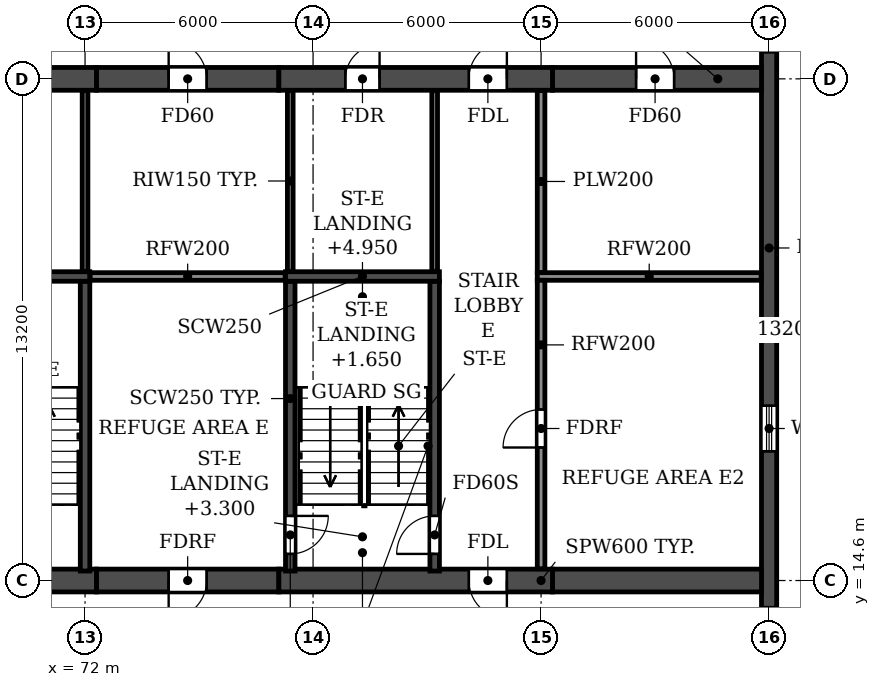
"""IFC4 building model, lengths in metres.
Left out: names, types, materials, properties, quantities, classifications, styles, units other than length and angle.
Written with IfcOpenShell. Run it as: python <this file> out.ifc"""

import sys

from ifc_helpers import new_model, si_unit, direction, frame, frame_2d, origin, place, context, subcontext, project, spatial, rectangle, extrude, element, fill, save


model = new_model("IFC4")
c1 = context("Model", 3, precision=1e-05, world=origin(), true_north=direction((0.0, 1.0)))
c2 = subcontext(c1, "Body", "Model", "MODEL_VIEW")
j1 = project(units=[si_unit("LENGTHUNIT", "METRE"), si_unit("PLANEANGLEUNIT", "RADIAN")], contexts=[c1])
p1 = place(None, origin())
s1 = spatial("IfcSite", under=j1, at=p1, CompositionType="ELEMENT")
p2 = place(p1, origin())
s2 = spatial("IfcBuilding", under=s1, at=p2, CompositionType="ELEMENT")
p3 = place(p2, frame((0.0, 0.0, 115.8)))
s3 = spatial("IfcBuildingStorey", under=s2, at=p3, CompositionType="ELEMENT", Elevation=115.8)
p4 = place(p3, frame((90.0, 4.683, 0.0), z_axis=(0.0, 0.0, 1.0), x_axis=(0.0, 1.0, 0.0)))
e1 = element("IfcWall", 1, at=p4, inside=s3, PredefinedType="SHEAR", context=c2, shape_type="SweptSolid", body=[
    extrude(rectangle(XDim=34.234, YDim=0.4, at=frame_2d((17.117, 0.0))), origin(), (0.0, 0.0, 1.0), 6.37),
])
p5 = place(p4, frame((23.817, 0.0, 0.9)))
e2 = element("IfcOpeningElement", 2, at=p5, cuts=e1, PredefinedType="OPENING", context=c2, shape_type="SweptSolid", body=[
    extrude(rectangle(XDim=1.2, YDim=1.5, at=frame_2d((0.6, 0.75))), frame((0.0, 0.21, 0.0), z_axis=(0.0, -1.0, 0.0), x_axis=(1.0, 0.0, 0.0)), (0.0, 0.0, 1.0), 0.42),
])
p6 = place(p4, frame((8.017, 0.0, 0.9)))
e3 = element("IfcOpeningElement", 3, at=p6, cuts=e1, PredefinedType="OPENING", context=c2, shape_type="SweptSolid", body=[
    extrude(rectangle(XDim=1.2, YDim=1.5, at=frame_2d((0.6, 0.75))), frame((0.0, 0.21, 0.0), z_axis=(0.0, -1.0, 0.0), x_axis=(1.0, 0.0, 0.0)), (0.0, 0.0, 1.0), 0.42),
])
p7 = place(p4, frame((13.317, 0.0, 0.9)))
e4 = element("IfcOpeningElement", 4, at=p7, cuts=e1, PredefinedType="OPENING", context=c2, shape_type="SweptSolid", body=[
    extrude(rectangle(XDim=1.2, YDim=1.5, at=frame_2d((0.6, 0.75))), frame((0.0, 0.21, 0.0), z_axis=(0.0, -1.0, 0.0), x_axis=(1.0, 0.0, 0.0)), (0.0, 0.0, 1.0), 0.42),
])
p8 = place(p3, frame((72.3, 14.6, 0.0), z_axis=(0.0, 0.0, 1.0), x_axis=(1.0, 0.0, 0.0)))
e5 = element("IfcWall", 5, at=p8, inside=s3, PredefinedType="SHEAR", context=c2, shape_type="SweptSolid", body=[
    extrude(rectangle(XDim=4.8, YDim=0.6, at=frame_2d((2.4, 0.0))), origin(), (0.0, 0.0, 1.0), 6.37),
])
p9 = place(p8, frame((1.9, 0.0, 0.0)))
e6 = element("IfcOpeningElement", 6, at=p9, cuts=e5, PredefinedType="OPENING", context=c2, shape_type="SweptSolid", body=[
    extrude(rectangle(XDim=1.0, YDim=2.1, at=frame_2d((0.5, 1.05))), frame((0.0, 0.31, 0.0), z_axis=(0.0, -1.0, 0.0), x_axis=(1.0, 0.0, 0.0)), (0.0, 0.0, 1.0), 0.62),
])
p10 = place(p3, frame((84.3, 14.6, 0.0), z_axis=(0.0, 0.0, 1.0), x_axis=(1.0, 0.0, 0.0)))
e7 = element("IfcWall", 7, at=p10, inside=s3, PredefinedType="SHEAR", context=c2, shape_type="SweptSolid", body=[
    extrude(rectangle(XDim=5.5, YDim=0.6, at=frame_2d((2.75, 0.0))), origin(), (0.0, 0.0, 1.0), 6.37),
])
p11 = place(p3, frame((72.3, 27.8, 0.0), z_axis=(0.0, 0.0, 1.0), x_axis=(1.0, 0.0, 0.0)))
e8 = element("IfcWall", 8, at=p11, inside=s3, PredefinedType="SHEAR", context=c2, shape_type="SweptSolid", body=[
    extrude(rectangle(XDim=4.8, YDim=0.6, at=frame_2d((2.4, 0.0))), origin(), (0.0, 0.0, 1.0), 6.37),
])
p12 = place(p11, frame((1.9, 0.0, 0.0)))
e9 = element("IfcOpeningElement", 9, at=p12, cuts=e8, PredefinedType="OPENING", context=c2, shape_type="SweptSolid", body=[
    extrude(rectangle(XDim=1.0, YDim=2.1, at=frame_2d((0.5, 1.05))), frame((0.0, 0.31, 0.0), z_axis=(0.0, -1.0, 0.0), x_axis=(1.0, 0.0, 0.0)), (0.0, 0.0, 1.0), 0.62),
])
p13 = place(p3, frame((84.3, 27.8, 0.0), z_axis=(0.0, 0.0, 1.0), x_axis=(1.0, 0.0, 0.0)))
e10 = element("IfcWall", 10, at=p13, inside=s3, PredefinedType="SHEAR", context=c2, shape_type="SweptSolid", body=[
    extrude(rectangle(XDim=5.5, YDim=0.6, at=frame_2d((2.75, 0.0))), origin(), (0.0, 0.0, 1.0), 6.37),
])
p14 = place(p13, frame((2.2, 0.0, 0.0)))
e11 = element("IfcOpeningElement", 11, at=p14, cuts=e10, PredefinedType="OPENING", context=c2, shape_type="SweptSolid", body=[
    extrude(rectangle(XDim=1.0, YDim=2.1, at=frame_2d((0.5, 1.05))), frame((0.0, 0.31, 0.0), z_axis=(0.0, -1.0, 0.0), x_axis=(1.0, 0.0, 0.0)), (0.0, 0.0, 1.0), 0.62),
])
p15 = place(p3, frame((29.7, 14.6, 0.0), z_axis=(0.0, 0.0, 1.0), x_axis=(1.0, 0.0, 0.0)))
e12 = element("IfcWall", 12, at=p15, inside=s3, PredefinedType="SOLIDWALL", context=c2, shape_type="SweptSolid", body=[
    extrude(rectangle(XDim=42.6, YDim=0.6, at=frame_2d((21.3, 0.0))), origin(), (0.0, 0.0, 1.0), 6.37),
])
p16 = place(p15, frame((1.7, 0.0, 0.0)))
e13 = element("IfcOpeningElement", 13, at=p16, cuts=e12, PredefinedType="OPENING", context=c2, shape_type="SweptSolid", body=[
    extrude(rectangle(XDim=1.0, YDim=2.1, at=frame_2d((0.5, 1.05))), frame((0.0, 0.31, 0.0), z_axis=(0.0, -1.0, 0.0), x_axis=(1.0, 0.0, 0.0)), (0.0, 0.0, 1.0), 0.62),
])
p17 = place(p15, frame((14.3, 0.0, 0.0)))
e14 = element("IfcOpeningElement", 14, at=p17, cuts=e12, PredefinedType="OPENING", context=c2, shape_type="SweptSolid", body=[
    extrude(rectangle(XDim=1.0, YDim=2.1, at=frame_2d((0.5, 1.05))), frame((0.0, 0.31, 0.0), z_axis=(0.0, -1.0, 0.0), x_axis=(1.0, 0.0, 0.0)), (0.0, 0.0, 1.0), 0.62),
])
p18 = place(p15, frame((18.2, 0.0, 0.0)))
e15 = element("IfcOpeningElement", 15, at=p18, cuts=e12, PredefinedType="OPENING", context=c2, shape_type="SweptSolid", body=[
    extrude(rectangle(XDim=1.0, YDim=2.1, at=frame_2d((0.5, 1.05))), frame((0.0, 0.31, 0.0), z_axis=(0.0, -1.0, 0.0), x_axis=(1.0, 0.0, 0.0)), (0.0, 0.0, 1.0), 0.62),
])
p19 = place(p15, frame((20.8, 0.0, 0.0)))
e16 = element("IfcOpeningElement", 16, at=p19, cuts=e12, PredefinedType="OPENING", context=c2, shape_type="SweptSolid", body=[
    extrude(rectangle(XDim=1.0, YDim=2.1, at=frame_2d((0.5, 1.05))), frame((0.0, 0.31, 0.0), z_axis=(0.0, -1.0, 0.0), x_axis=(1.0, 0.0, 0.0)), (0.0, 0.0, 1.0), 0.62),
])
p20 = place(p15, frame((26.0, 0.0, 0.0)))
e17 = element("IfcOpeningElement", 17, at=p20, cuts=e12, PredefinedType="OPENING", context=c2, shape_type="SweptSolid", body=[
    extrude(rectangle(XDim=1.0, YDim=2.1, at=frame_2d((0.5, 1.05))), frame((0.0, 0.31, 0.0), z_axis=(0.0, -1.0, 0.0), x_axis=(1.0, 0.0, 0.0)), (0.0, 0.0, 1.0), 0.62),
])
p21 = place(p15, frame((39.9, 0.0, 0.0)))
e18 = element("IfcOpeningElement", 18, at=p21, cuts=e12, PredefinedType="OPENING", context=c2, shape_type="SweptSolid", body=[
    extrude(rectangle(XDim=1.0, YDim=2.1, at=frame_2d((0.5, 1.05))), frame((0.0, 0.31, 0.0), z_axis=(0.0, -1.0, 0.0), x_axis=(1.0, 0.0, 0.0)), (0.0, 0.0, 1.0), 0.62),
])
p22 = place(p3, frame((77.1, 14.6, 0.0), z_axis=(0.0, 0.0, 1.0), x_axis=(1.0, 0.0, 0.0)))
e19 = element("IfcWall", 19, at=p22, inside=s3, PredefinedType="SOLIDWALL", context=c2, shape_type="SweptSolid", body=[
    extrude(rectangle(XDim=7.2, YDim=0.6, at=frame_2d((3.6, 0.0))), origin(), (0.0, 0.0, 1.0), 6.37),
])
p23 = place(p22, frame((5.0, 0.0, 0.0)))
e20 = element("IfcOpeningElement", 20, at=p23, cuts=e19, PredefinedType="OPENING", context=c2, shape_type="SweptSolid", body=[
    extrude(rectangle(XDim=1.0, YDim=2.1, at=frame_2d((0.5, 1.05))), frame((0.0, 0.31, 0.0), z_axis=(0.0, -1.0, 0.0), x_axis=(1.0, 0.0, 0.0)), (0.0, 0.0, 1.0), 0.62),
])
p24 = place(p3, frame((29.7, 27.8, 0.0), z_axis=(0.0, 0.0, 1.0), x_axis=(1.0, 0.0, 0.0)))
e21 = element("IfcWall", 21, at=p24, inside=s3, PredefinedType="SOLIDWALL", context=c2, shape_type="SweptSolid", body=[
    extrude(rectangle(XDim=42.6, YDim=0.6, at=frame_2d((21.3, 0.0))), origin(), (0.0, 0.0, 1.0), 6.37),
])
p25 = place(p24, frame((1.75, 0.0, 0.0)))
e22 = element("IfcOpeningElement", 22, at=p25, cuts=e21, PredefinedType="OPENING", context=c2, shape_type="SweptSolid", body=[
    extrude(rectangle(XDim=0.9, YDim=2.1, at=frame_2d((0.45, 1.05))), frame((0.0, 0.31, 0.0), z_axis=(0.0, -1.0, 0.0), x_axis=(1.0, 0.0, 0.0)), (0.0, 0.0, 1.0), 0.62),
])
p26 = place(p24, frame((6.2, 0.0, 0.0)))
e23 = element("IfcOpeningElement", 23, at=p26, cuts=e21, PredefinedType="OPENING", context=c2, shape_type="SweptSolid", body=[
    extrude(rectangle(XDim=1.0, YDim=2.1, at=frame_2d((0.5, 1.05))), frame((0.0, 0.31, 0.0), z_axis=(0.0, -1.0, 0.0), x_axis=(1.0, 0.0, 0.0)), (0.0, 0.0, 1.0), 0.62),
])
p27 = place(p24, frame((11.4, 0.0, 0.0)))
e24 = element("IfcOpeningElement", 24, at=p27, cuts=e21, PredefinedType="OPENING", context=c2, shape_type="SweptSolid", body=[
    extrude(rectangle(XDim=1.0, YDim=2.1, at=frame_2d((0.5, 1.05))), frame((0.0, 0.31, 0.0), z_axis=(0.0, -1.0, 0.0), x_axis=(1.0, 0.0, 0.0)), (0.0, 0.0, 1.0), 0.62),
])
p28 = place(p24, frame((17.9, 0.0, 0.0)))
e25 = element("IfcOpeningElement", 25, at=p28, cuts=e21, PredefinedType="OPENING", context=c2, shape_type="SweptSolid", body=[
    extrude(rectangle(XDim=1.0, YDim=2.1, at=frame_2d((0.5, 1.05))), frame((0.0, 0.31, 0.0), z_axis=(0.0, -1.0, 0.0), x_axis=(1.0, 0.0, 0.0)), (0.0, 0.0, 1.0), 0.62),
])
p29 = place(p24, frame((20.8, 0.0, 0.0)))
e26 = element("IfcOpeningElement", 26, at=p29, cuts=e21, PredefinedType="OPENING", context=c2, shape_type="SweptSolid", body=[
    extrude(rectangle(XDim=1.0, YDim=2.1, at=frame_2d((0.5, 1.05))), frame((0.0, 0.31, 0.0), z_axis=(0.0, -1.0, 0.0), x_axis=(1.0, 0.0, 0.0)), (0.0, 0.0, 1.0), 0.62),
])
p30 = place(p24, frame((25.0, 0.0, 0.0)))
e27 = element("IfcOpeningElement", 27, at=p30, cuts=e21, PredefinedType="OPENING", context=c2, shape_type="SweptSolid", body=[
    extrude(rectangle(XDim=1.0, YDim=2.1, at=frame_2d((0.5, 1.05))), frame((0.0, 0.31, 0.0), z_axis=(0.0, -1.0, 0.0), x_axis=(1.0, 0.0, 0.0)), (0.0, 0.0, 1.0), 0.62),
])
p31 = place(p24, frame((30.2, 0.0, 0.0)))
e28 = element("IfcOpeningElement", 28, at=p31, cuts=e21, PredefinedType="OPENING", context=c2, shape_type="SweptSolid", body=[
    extrude(rectangle(XDim=1.0, YDim=2.1, at=frame_2d((0.5, 1.05))), frame((0.0, 0.31, 0.0), z_axis=(0.0, -1.0, 0.0), x_axis=(1.0, 0.0, 0.0)), (0.0, 0.0, 1.0), 0.62),
])
p32 = place(p24, frame((35.15, 0.0, 0.0)))
e29 = element("IfcOpeningElement", 29, at=p32, cuts=e21, PredefinedType="OPENING", context=c2, shape_type="SweptSolid", body=[
    extrude(rectangle(XDim=1.5, YDim=2.1, at=frame_2d((0.75, 1.05))), frame((0.0, 0.31, 0.0), z_axis=(0.0, -1.0, 0.0), x_axis=(1.0, 0.0, 0.0)), (0.0, 0.0, 1.0), 0.62),
])
p33 = place(p24, frame((39.95, 0.0, 0.0)))
e30 = element("IfcOpeningElement", 30, at=p33, cuts=e21, PredefinedType="OPENING", context=c2, shape_type="SweptSolid", body=[
    extrude(rectangle(XDim=0.9, YDim=2.1, at=frame_2d((0.45, 1.05))), frame((0.0, 0.31, 0.0), z_axis=(0.0, -1.0, 0.0), x_axis=(1.0, 0.0, 0.0)), (0.0, 0.0, 1.0), 0.62),
])
p34 = place(p3, frame((77.1, 27.8, 0.0), z_axis=(0.0, 0.0, 1.0), x_axis=(1.0, 0.0, 0.0)))
e31 = element("IfcWall", 31, at=p34, inside=s3, PredefinedType="SOLIDWALL", context=c2, shape_type="SweptSolid", body=[
    extrude(rectangle(XDim=7.2, YDim=0.6, at=frame_2d((3.6, 0.0))), origin(), (0.0, 0.0, 1.0), 6.37),
])
p35 = place(p34, frame((1.75, 0.0, 0.0)))
e32 = element("IfcOpeningElement", 32, at=p35, cuts=e31, PredefinedType="OPENING", context=c2, shape_type="SweptSolid", body=[
    extrude(rectangle(XDim=0.9, YDim=2.1, at=frame_2d((0.45, 1.05))), frame((0.0, 0.31, 0.0), z_axis=(0.0, -1.0, 0.0), x_axis=(1.0, 0.0, 0.0)), (0.0, 0.0, 1.0), 0.62),
])
p36 = place(p34, frame((5.0, 0.0, 0.0)))
e33 = element("IfcOpeningElement", 33, at=p36, cuts=e31, PredefinedType="OPENING", context=c2, shape_type="SweptSolid", body=[
    extrude(rectangle(XDim=1.0, YDim=2.1, at=frame_2d((0.5, 1.05))), frame((0.0, 0.31, 0.0), z_axis=(0.0, -1.0, 0.0), x_axis=(1.0, 0.0, 0.0)), (0.0, 0.0, 1.0), 0.62),
])
p37 = place(p3, frame((72.0, 14.85, 0.0), z_axis=(0.0, 0.0, 1.0), x_axis=(0.0, 1.0, 0.0)))
e34 = element("IfcWall", 34, at=p37, inside=s3, PredefinedType="SOLIDWALL", context=c2, shape_type="SweptSolid", body=[
    extrude(rectangle(XDim=7.625, YDim=0.25, at=frame_2d((3.812, 0.0))), origin(), (0.0, 0.0, 1.0), 6.37),
])
p38 = place(p3, frame((68.075, 22.6, 0.0), z_axis=(0.0, 0.0, 1.0), x_axis=(1.0, 0.0, 0.0)))
e35 = element("IfcWall", 35, at=p38, inside=s3, PredefinedType="SOLIDWALL", context=c2, shape_type="SweptSolid", body=[
    extrude(rectangle(XDim=4.05, YDim=0.25, at=frame_2d((2.025, 0.0))), origin(), (0.0, 0.0, 1.0), 6.37),
])
p39 = place(p3, frame((77.4, 14.85, 0.0), z_axis=(0.0, 0.0, 1.0), x_axis=(0.0, 1.0, 0.0)))
e36 = element("IfcWall", 36, at=p39, inside=s3, PredefinedType="SOLIDWALL", context=c2, shape_type="SweptSolid", body=[
    extrude(rectangle(XDim=7.625, YDim=0.25, at=frame_2d((3.812, 0.0))), origin(), (0.0, 0.0, 1.0), 6.37),
])
p40 = place(p39, frame((0.45, 0.0, 0.0)))
e37 = element("IfcOpeningElement", 37, at=p40, cuts=e36, PredefinedType="OPENING", context=c2, shape_type="SweptSolid", body=[
    extrude(rectangle(XDim=1.0, YDim=2.1, at=frame_2d((0.5, 1.05))), frame((0.0, 0.135, 0.0), z_axis=(0.0, -1.0, 0.0), x_axis=(1.0, 0.0, 0.0)), (0.0, 0.0, 1.0), 0.27),
])
p41 = place(p3, frame((81.2, 14.85, 0.0), z_axis=(0.0, 0.0, 1.0), x_axis=(0.0, 1.0, 0.0)))
e38 = element("IfcWall", 38, at=p41, inside=s3, PredefinedType="SOLIDWALL", context=c2, shape_type="SweptSolid", body=[
    extrude(rectangle(XDim=7.625, YDim=0.25, at=frame_2d((3.812, 0.0))), origin(), (0.0, 0.0, 1.0), 6.37),
])
p42 = place(p41, frame((0.45, 0.0, 0.0)))
e39 = element("IfcOpeningElement", 39, at=p42, cuts=e38, PredefinedType="OPENING", context=c2, shape_type="SweptSolid", body=[
    extrude(rectangle(XDim=1.0, YDim=2.1, at=frame_2d((0.5, 1.05))), frame((0.0, 0.135, 0.0), z_axis=(0.0, -1.0, 0.0), x_axis=(1.0, 0.0, 0.0)), (0.0, 0.0, 1.0), 0.27),
])
p43 = place(p3, frame((77.275, 22.6, 0.0), z_axis=(0.0, 0.0, 1.0), x_axis=(1.0, 0.0, 0.0)))
e40 = element("IfcWall", 40, at=p43, inside=s3, PredefinedType="SOLIDWALL", context=c2, shape_type="SweptSolid", body=[
    extrude(rectangle(XDim=4.05, YDim=0.25, at=frame_2d((2.025, 0.0))), origin(), (0.0, 0.0, 1.0), 6.37),
])
p44 = place(p3, frame((84.0, 22.7, 0.0), z_axis=(0.0, 0.0, 1.0), x_axis=(0.0, 1.0, 0.0)))
e41 = element("IfcWall", 41, at=p44, inside=s3, PredefinedType="PARTITIONING", context=c2, shape_type="SweptSolid", body=[
    extrude(rectangle(XDim=4.79, YDim=0.2, at=frame_2d((2.395, 0.0))), origin(), (0.0, 0.0, 1.0), 6.37),
])
p45 = place(p3, frame((72.135, 22.6, 0.0), z_axis=(0.0, 0.0, 1.0), x_axis=(1.0, 0.0, 0.0)))
e42 = element("IfcWall", 42, at=p45, inside=s3, PredefinedType="PARTITIONING", context=c2, shape_type="SweptSolid", body=[
    extrude(rectangle(XDim=5.13, YDim=0.2, at=frame_2d((2.565, 0.0))), origin(), (0.0, 0.0, 1.0), 6.37),
])
p46 = place(p3, frame((83.9, 22.6, 0.0), z_axis=(0.0, 0.0, 1.0), x_axis=(1.0, 0.0, 0.0)))
e43 = element("IfcWall", 43, at=p46, inside=s3, PredefinedType="PARTITIONING", context=c2, shape_type="SweptSolid", body=[
    extrude(rectangle(XDim=5.89, YDim=0.2, at=frame_2d((2.945, 0.0))), origin(), (0.0, 0.0, 1.0), 6.37),
])
p47 = place(p3, frame((84.0, 14.91, 0.0), z_axis=(0.0, 0.0, 1.0), x_axis=(0.0, 1.0, 0.0)))
e44 = element("IfcWall", 44, at=p47, inside=s3, PredefinedType="PARTITIONING", context=c2, shape_type="SweptSolid", body=[
    extrude(rectangle(XDim=7.59, YDim=0.2, at=frame_2d((3.795, 0.0))), origin(), (0.0, 0.0, 1.0), 6.37),
])
p48 = place(p47, frame((3.19, 0.0, 0.0)))
e45 = element("IfcOpeningElement", 45, at=p48, cuts=e44, PredefinedType="OPENING", context=c2, shape_type="SweptSolid", body=[
    extrude(rectangle(XDim=1.0, YDim=2.1, at=frame_2d((0.5, 1.05))), frame((0.0, 0.11, 0.0), z_axis=(0.0, -1.0, 0.0), x_axis=(1.0, 0.0, 0.0)), (0.0, 0.0, 1.0), 0.22),
])
for number, where, z_axis, x_axis in (
    (46, (72.0, 22.735, 0.0), (0.0, 0.0, 1.0), (0.0, 1.0, 0.0)),
    (47, (77.4, 22.735, 0.0), (0.0, 0.0, 1.0), (0.0, 1.0, 0.0)),
    (48, (81.2, 22.735, 0.0), (0.0, 0.0, 1.0), (0.0, 1.0, 0.0)),
):
    element("IfcWall", number, at=place(p3, frame(where, z_axis=z_axis, x_axis=x_axis)), inside=s3, PredefinedType="PARTITIONING", context=c2, shape_type="SweptSolid", body=[
        extrude(rectangle(XDim=4.755, YDim=0.15, at=frame_2d((2.377, 0.0))), origin(), (0.0, 0.0, 1.0), 6.37),
    ])
p49 = place(p6, origin())
e49 = element("IfcWindow", 49, at=p49, inside=s3, PartitioningType="SINGLE_PANEL", PredefinedType="WINDOW", context=c2, shape_type="SweptSolid", body=[
    extrude(rectangle(XDim=1.2, YDim=1.5, at=frame_2d((0.6, 0.75))), frame((0.0, 0.03, 0.0), z_axis=(0.0, -1.0, 0.0), x_axis=(1.0, 0.0, 0.0)), (0.0, 0.0, 1.0), 0.06),
])
fill(e3, e49)
p50 = place(p7, origin())
e50 = element("IfcWindow", 50, at=p50, inside=s3, PartitioningType="SINGLE_PANEL", PredefinedType="WINDOW", context=c2, shape_type="SweptSolid", body=[
    extrude(rectangle(XDim=1.2, YDim=1.5, at=frame_2d((0.6, 0.75))), frame((0.0, 0.03, 0.0), z_axis=(0.0, -1.0, 0.0), x_axis=(1.0, 0.0, 0.0)), (0.0, 0.0, 1.0), 0.06),
])
fill(e4, e50)
p51 = place(p12, origin())
e51 = element("IfcDoor", 51, at=p51, inside=s3, OperationType="SINGLE_SWING_LEFT", PredefinedType="DOOR", context=c2, shape_type="SweptSolid", body=[
    extrude(rectangle(XDim=1.0, YDim=2.1, at=frame_2d((0.5, 1.05))), frame((0.0, 0.025, 0.0), z_axis=(0.0, -1.0, 0.0), x_axis=(1.0, 0.0, 0.0)), (0.0, 0.0, 1.0), 0.05),
])
fill(e9, e51)
p52 = place(p35, origin())
e52 = element("IfcDoor", 52, at=p52, inside=s3, OperationType="SINGLE_SWING_RIGHT", PredefinedType="DOOR", context=c2, shape_type="SweptSolid", body=[
    extrude(rectangle(XDim=0.9, YDim=2.1, at=frame_2d((0.45, 1.05))), frame((0.0, 0.025, 0.0), z_axis=(0.0, -1.0, 0.0), x_axis=(1.0, 0.0, 0.0)), (0.0, 0.0, 1.0), 0.05),
])
fill(e32, e52)
p53 = place(p36, origin())
e53 = element("IfcDoor", 53, at=p53, inside=s3, OperationType="SINGLE_SWING_RIGHT", PredefinedType="DOOR", context=c2, shape_type="SweptSolid", body=[
    extrude(rectangle(XDim=1.0, YDim=2.1, at=frame_2d((0.5, 1.05))), frame((0.0, 0.025, 0.0), z_axis=(0.0, -1.0, 0.0), x_axis=(1.0, 0.0, 0.0)), (0.0, 0.0, 1.0), 0.05),
])
fill(e33, e53)
p54 = place(p14, origin())
e54 = element("IfcDoor", 54, at=p54, inside=s3, OperationType="SINGLE_SWING_LEFT", PredefinedType="DOOR", context=c2, shape_type="SweptSolid", body=[
    extrude(rectangle(XDim=1.0, YDim=2.1, at=frame_2d((0.5, 1.05))), frame((0.0, 0.025, 0.0), z_axis=(0.0, -1.0, 0.0), x_axis=(1.0, 0.0, 0.0)), (0.0, 0.0, 1.0), 0.05),
])
fill(e11, e54)
p55 = place(p9, frame((1.0, 0.0, 0.0), z_axis=(0.0, 0.0, 1.0), x_axis=(-1.0, 0.0, 0.0)))
e55 = element("IfcDoor", 55, at=p55, inside=s3, OperationType="SINGLE_SWING_RIGHT", PredefinedType="DOOR", context=c2, shape_type="SweptSolid", body=[
    extrude(rectangle(XDim=1.0, YDim=2.1, at=frame_2d((0.5, 1.05))), frame((0.0, 0.025, 0.0), z_axis=(0.0, -1.0, 0.0), x_axis=(1.0, 0.0, 0.0)), (0.0, 0.0, 1.0), 0.05),
])
fill(e6, e55)
p56 = place(p23, frame((1.0, 0.0, 0.0), z_axis=(0.0, 0.0, 1.0), x_axis=(-1.0, 0.0, 0.0)))
e56 = element("IfcDoor", 56, at=p56, inside=s3, OperationType="SINGLE_SWING_LEFT", PredefinedType="DOOR", context=c2, shape_type="SweptSolid", body=[
    extrude(rectangle(XDim=1.0, YDim=2.1, at=frame_2d((0.5, 1.05))), frame((0.0, 0.025, 0.0), z_axis=(0.0, -1.0, 0.0), x_axis=(1.0, 0.0, 0.0)), (0.0, 0.0, 1.0), 0.05),
])
fill(e20, e56)
p57 = place(p40, frame((1.0, 0.0, 0.0), z_axis=(0.0, 0.0, 1.0), x_axis=(-1.0, 0.0, 0.0)))
e57 = element("IfcDoor", 57, at=p57, inside=s3, OperationType="SINGLE_SWING_LEFT", PredefinedType="DOOR", context=c2, shape_type="SweptSolid", body=[
    extrude(rectangle(XDim=1.0, YDim=2.1, at=frame_2d((0.5, 1.05))), frame((0.0, 0.025, 0.0), z_axis=(0.0, -1.0, 0.0), x_axis=(1.0, 0.0, 0.0)), (0.0, 0.0, 1.0), 0.05),
])
fill(e37, e57)
p58 = place(p42, origin())
e58 = element("IfcDoor", 58, at=p58, inside=s3, OperationType="SINGLE_SWING_LEFT", PredefinedType="DOOR", context=c2, shape_type="SweptSolid", body=[
    extrude(rectangle(XDim=1.0, YDim=2.1, at=frame_2d((0.5, 1.05))), frame((0.0, 0.025, 0.0), z_axis=(0.0, -1.0, 0.0), x_axis=(1.0, 0.0, 0.0)), (0.0, 0.0, 1.0), 0.05),
])
fill(e39, e58)
p59 = place(p48, origin())
e59 = element("IfcDoor", 59, at=p59, inside=s3, OperationType="SINGLE_SWING_LEFT", PredefinedType="DOOR", context=c2, shape_type="SweptSolid", body=[
    extrude(rectangle(XDim=1.0, YDim=2.1, at=frame_2d((0.5, 1.05))), frame((0.0, 0.025, 0.0), z_axis=(0.0, -1.0, 0.0), x_axis=(1.0, 0.0, 0.0)), (0.0, 0.0, 1.0), 0.05),
])
fill(e45, e59)
save(model, sys.argv[1])
